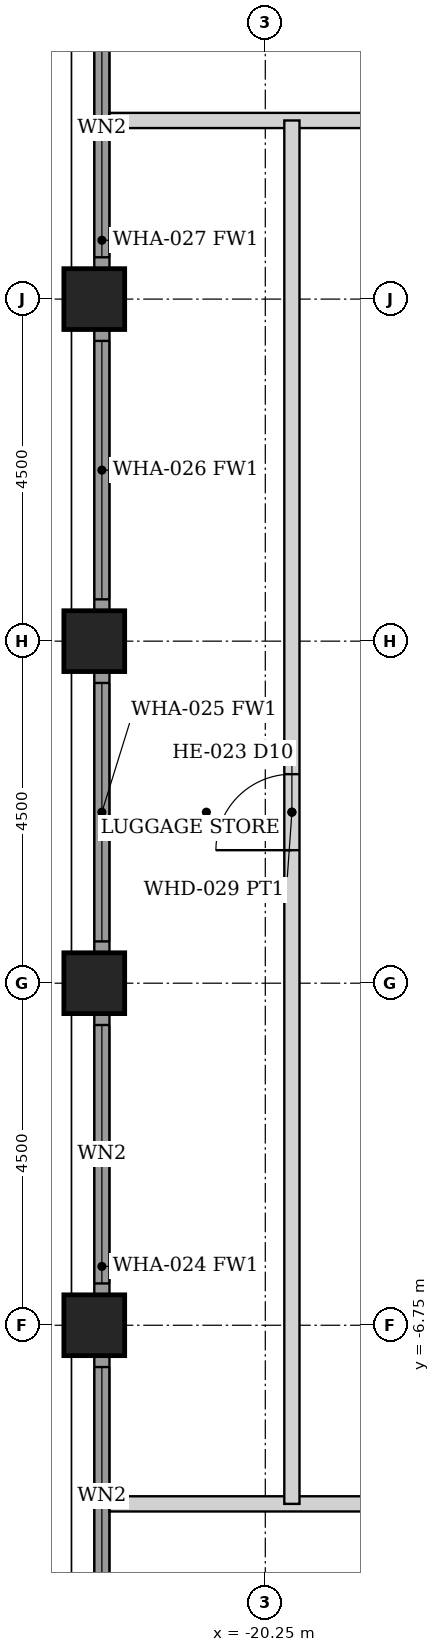
"""IFC4 building model, lengths in metres.
Left out: names, types, materials, properties, quantities, classifications, styles, units other than length and angle.
Written with IfcOpenShell. Run it as: python <this file> out.ifc"""

import sys

from ifc_helpers import new_model, si_unit, direction, frame, frame_2d, origin, origin_2d, place, context, subcontext, project, spatial, rectangle, hollow_rectangle, extrude, element, fill, save


model = new_model("IFC4")
c1 = context("Model", 3, precision=1e-05, world=origin(), true_north=direction((0.0, 1.0)))
c2 = subcontext(c1, "Body", "Model", "MODEL_VIEW")
j1 = project(units=[si_unit("LENGTHUNIT", "METRE"), si_unit("PLANEANGLEUNIT", "RADIAN")], contexts=[c1])
p1 = place(None, origin())
s1 = spatial("IfcSite", under=j1, at=p1, CompositionType="ELEMENT")
p2 = place(p1, origin())
s2 = spatial("IfcBuilding", under=s1, at=p2, CompositionType="ELEMENT")
p3 = place(p2, frame((0.0, 0.0, 161.6)))
s3 = spatial("IfcBuildingStorey", under=s2, at=p3, CompositionType="ELEMENT", Elevation=161.6)
for number, where, z_axis, x_axis in (
    (1, (-22.5, -6.75, 0.0), (0.0, 0.0, 1.0), (1.0, 0.0, 0.0)),
    (2, (-22.5, -2.25, 0.0), (0.0, 0.0, 1.0), (1.0, 0.0, 0.0)),
    (3, (-22.5, 2.25, 0.0), (0.0, 0.0, 1.0), (1.0, 0.0, 0.0)),
    (4, (-22.5, 6.75, 0.0), (0.0, 0.0, 1.0), (1.0, 0.0, 0.0)),
):
    element("IfcColumn", number, at=place(p3, frame(where, z_axis=z_axis, x_axis=x_axis)), inside=s3, PredefinedType="COLUMN", context=c2, shape_type="SweptSolid", body=[
        extrude(hollow_rectangle(XDim=0.8, YDim=0.8, WallThickness=0.05, at=origin_2d()), origin(), (0.0, 0.0, 1.0), 3.6),
    ])
p4 = place(p3, frame((-22.4, -10.845, 0.0), z_axis=(0.0, 0.0, 1.0), x_axis=(0.0, 1.0, 0.0)))
e5 = element("IfcWall", 5, at=p4, inside=s3, PredefinedType="SOLIDWALL", context=c2, shape_type="SweptSolid", body=[
    extrude(rectangle(XDim=3.69, YDim=0.2, at=frame_2d((1.845, 0.0))), origin(), (0.0, 0.0, 1.0), 2.479),
])
p5 = place(p4, frame((0.145, 0.0, 0.3)))
e6 = element("IfcOpeningElement", 6, at=p5, cuts=e5, PredefinedType="OPENING", context=c2, shape_type="SweptSolid", body=[
    extrude(rectangle(XDim=3.4, YDim=2.029, at=frame_2d((1.7, 1.015))), frame((0.0, 0.11, 0.0), z_axis=(0.0, -1.0, 0.0), x_axis=(1.0, 0.0, 0.0)), (0.0, 0.0, 1.0), 0.22),
])
p6 = place(p3, frame((-22.4, -6.345, 0.0), z_axis=(0.0, 0.0, 1.0), x_axis=(0.0, 1.0, 0.0)))
e7 = element("IfcWall", 7, at=p6, inside=s3, PredefinedType="SOLIDWALL", context=c2, shape_type="SweptSolid", body=[
    extrude(rectangle(XDim=3.69, YDim=0.2, at=frame_2d((1.845, 0.0))), origin(), (0.0, 0.0, 1.0), 2.479),
])
p7 = place(p6, frame((0.145, 0.0, 0.3)))
e8 = element("IfcOpeningElement", 8, at=p7, cuts=e7, PredefinedType="OPENING", context=c2, shape_type="SweptSolid", body=[
    extrude(rectangle(XDim=3.4, YDim=2.029, at=frame_2d((1.7, 1.015))), frame((0.0, 0.11, 0.0), z_axis=(0.0, -1.0, 0.0), x_axis=(1.0, 0.0, 0.0)), (0.0, 0.0, 1.0), 0.22),
])
p8 = place(p3, frame((-22.4, -1.845, 0.0), z_axis=(0.0, 0.0, 1.0), x_axis=(0.0, 1.0, 0.0)))
e9 = element("IfcWall", 9, at=p8, inside=s3, PredefinedType="SOLIDWALL", context=c2, shape_type="SweptSolid", body=[
    extrude(rectangle(XDim=3.69, YDim=0.2, at=frame_2d((1.845, 0.0))), origin(), (0.0, 0.0, 1.0), 2.479),
])
p9 = place(p8, frame((0.145, 0.0, 0.3)))
e10 = element("IfcOpeningElement", 10, at=p9, cuts=e9, PredefinedType="OPENING", context=c2, shape_type="SweptSolid", body=[
    extrude(rectangle(XDim=3.4, YDim=2.029, at=frame_2d((1.7, 1.015))), frame((0.0, 0.11, 0.0), z_axis=(0.0, -1.0, 0.0), x_axis=(1.0, 0.0, 0.0)), (0.0, 0.0, 1.0), 0.22),
])
p10 = place(p3, frame((-22.4, 2.655, 0.0), z_axis=(0.0, 0.0, 1.0), x_axis=(0.0, 1.0, 0.0)))
e11 = element("IfcWall", 11, at=p10, inside=s3, PredefinedType="SOLIDWALL", context=c2, shape_type="SweptSolid", body=[
    extrude(rectangle(XDim=3.69, YDim=0.2, at=frame_2d((1.845, 0.0))), origin(), (0.0, 0.0, 1.0), 2.479),
])
p11 = place(p10, frame((0.145, 0.0, 0.3)))
e12 = element("IfcOpeningElement", 12, at=p11, cuts=e11, PredefinedType="OPENING", context=c2, shape_type="SweptSolid", body=[
    extrude(rectangle(XDim=3.4, YDim=2.029, at=frame_2d((1.7, 1.015))), frame((0.0, 0.11, 0.0), z_axis=(0.0, -1.0, 0.0), x_axis=(1.0, 0.0, 0.0)), (0.0, 0.0, 1.0), 0.22),
])
p12 = place(p3, frame((-22.4, 7.155, 0.0), z_axis=(0.0, 0.0, 1.0), x_axis=(0.0, 1.0, 0.0)))
e13 = element("IfcWall", 13, at=p12, inside=s3, PredefinedType="SOLIDWALL", context=c2, shape_type="SweptSolid", body=[
    extrude(rectangle(XDim=3.69, YDim=0.2, at=frame_2d((1.845, 0.0))), origin(), (0.0, 0.0, 1.0), 2.479),
])
p13 = place(p12, frame((0.145, 0.0, 0.3)))
e14 = element("IfcOpeningElement", 14, at=p13, cuts=e13, PredefinedType="OPENING", context=c2, shape_type="SweptSolid", body=[
    extrude(rectangle(XDim=3.4, YDim=2.029, at=frame_2d((1.7, 1.015))), frame((0.0, 0.11, 0.0), z_axis=(0.0, -1.0, 0.0), x_axis=(1.0, 0.0, 0.0)), (0.0, 0.0, 1.0), 0.22),
])
p14 = place(p3, frame((-22.3, 9.1, 0.0), z_axis=(0.0, 0.0, 1.0), x_axis=(1.0, 0.0, 0.0)))
e15 = element("IfcWall", 15, at=p14, inside=s3, PredefinedType="PARTITIONING", context=c2, shape_type="SweptSolid", body=[
    extrude(rectangle(XDim=44.6, YDim=0.2, at=frame_2d((22.3, 0.0))), origin(), (0.0, 0.0, 1.0), 2.473),
])
p15 = place(p14, frame((6.75, 0.0, 0.0)))
e16 = element("IfcOpeningElement", 16, at=p15, cuts=e15, PredefinedType="OPENING", context=c2, shape_type="SweptSolid", body=[
    extrude(rectangle(XDim=0.9, YDim=2.1, at=frame_2d((0.45, 1.05))), frame((0.0, 0.11, 0.0), z_axis=(0.0, -1.0, 0.0), x_axis=(1.0, 0.0, 0.0)), (0.0, 0.0, 1.0), 0.22),
])
p16 = place(p14, frame((15.75, 0.0, 0.0)))
e17 = element("IfcOpeningElement", 17, at=p16, cuts=e15, PredefinedType="OPENING", context=c2, shape_type="SweptSolid", body=[
    extrude(rectangle(XDim=0.9, YDim=2.1, at=frame_2d((0.45, 1.05))), frame((0.0, 0.11, 0.0), z_axis=(0.0, -1.0, 0.0), x_axis=(1.0, 0.0, 0.0)), (0.0, 0.0, 1.0), 0.22),
])
p17 = place(p14, frame((20.25, 0.0, 0.0)))
e18 = element("IfcOpeningElement", 18, at=p17, cuts=e15, PredefinedType="OPENING", context=c2, shape_type="SweptSolid", body=[
    extrude(rectangle(XDim=0.9, YDim=2.1, at=frame_2d((0.45, 1.05))), frame((0.0, 0.11, 0.0), z_axis=(0.0, -1.0, 0.0), x_axis=(1.0, 0.0, 0.0)), (0.0, 0.0, 1.0), 0.22),
])
p18 = place(p14, frame((36.95, 0.0, 0.0)))
e19 = element("IfcOpeningElement", 19, at=p18, cuts=e15, PredefinedType="OPENING", context=c2, shape_type="SweptSolid", body=[
    extrude(rectangle(XDim=0.9, YDim=2.1, at=frame_2d((0.45, 1.05))), frame((0.0, 0.11, 0.0), z_axis=(0.0, -1.0, 0.0), x_axis=(1.0, 0.0, 0.0)), (0.0, 0.0, 1.0), 0.22),
])
p19 = place(p14, frame((38.85, 0.0, 0.0)))
e20 = element("IfcOpeningElement", 20, at=p19, cuts=e15, PredefinedType="OPENING", context=c2, shape_type="SweptSolid", body=[
    extrude(rectangle(XDim=0.9, YDim=2.1, at=frame_2d((0.45, 1.05))), frame((0.0, 0.11, 0.0), z_axis=(0.0, -1.0, 0.0), x_axis=(1.0, 0.0, 0.0)), (0.0, 0.0, 1.0), 0.22),
])
p20 = place(p14, frame((4.85, 0.0, 0.0)))
e21 = element("IfcOpeningElement", 21, at=p20, cuts=e15, PredefinedType="OPENING", context=c2, shape_type="SweptSolid", body=[
    extrude(rectangle(XDim=0.9, YDim=2.1, at=frame_2d((0.45, 1.05))), frame((0.0, 0.11, 0.0), z_axis=(0.0, -1.0, 0.0), x_axis=(1.0, 0.0, 0.0)), (0.0, 0.0, 1.0), 0.22),
])
p21 = place(p3, frame((-22.3, -9.1, 0.0), z_axis=(0.0, 0.0, 1.0), x_axis=(1.0, 0.0, 0.0)))
e22 = element("IfcWall", 22, at=p21, inside=s3, PredefinedType="PARTITIONING", context=c2, shape_type="SweptSolid", body=[
    extrude(rectangle(XDim=44.6, YDim=0.2, at=frame_2d((22.3, 0.0))), origin(), (0.0, 0.0, 1.0), 2.473),
])
p22 = place(p21, frame((6.75, 0.0, 0.0)))
e23 = element("IfcOpeningElement", 23, at=p22, cuts=e22, PredefinedType="OPENING", context=c2, shape_type="SweptSolid", body=[
    extrude(rectangle(XDim=0.9, YDim=2.1, at=frame_2d((0.45, 1.05))), frame((0.0, 0.11, 0.0), z_axis=(0.0, -1.0, 0.0), x_axis=(1.0, 0.0, 0.0)), (0.0, 0.0, 1.0), 0.22),
])
p23 = place(p21, frame((23.45, 0.0, 0.0)))
e24 = element("IfcOpeningElement", 24, at=p23, cuts=e22, PredefinedType="OPENING", context=c2, shape_type="SweptSolid", body=[
    extrude(rectangle(XDim=0.9, YDim=2.1, at=frame_2d((0.45, 1.05))), frame((0.0, 0.11, 0.0), z_axis=(0.0, -1.0, 0.0), x_axis=(1.0, 0.0, 0.0)), (0.0, 0.0, 1.0), 0.22),
])
p24 = place(p21, frame((27.95, 0.0, 0.0)))
e25 = element("IfcOpeningElement", 25, at=p24, cuts=e22, PredefinedType="OPENING", context=c2, shape_type="SweptSolid", body=[
    extrude(rectangle(XDim=0.9, YDim=2.1, at=frame_2d((0.45, 1.05))), frame((0.0, 0.11, 0.0), z_axis=(0.0, -1.0, 0.0), x_axis=(1.0, 0.0, 0.0)), (0.0, 0.0, 1.0), 0.22),
])
p25 = place(p21, frame((36.95, 0.0, 0.0)))
e26 = element("IfcOpeningElement", 26, at=p25, cuts=e22, PredefinedType="OPENING", context=c2, shape_type="SweptSolid", body=[
    extrude(rectangle(XDim=0.9, YDim=2.1, at=frame_2d((0.45, 1.05))), frame((0.0, 0.11, 0.0), z_axis=(0.0, -1.0, 0.0), x_axis=(1.0, 0.0, 0.0)), (0.0, 0.0, 1.0), 0.22),
])
p26 = place(p21, frame((38.85, 0.0, 0.0)))
e27 = element("IfcOpeningElement", 27, at=p26, cuts=e22, PredefinedType="OPENING", context=c2, shape_type="SweptSolid", body=[
    extrude(rectangle(XDim=0.9, YDim=2.1, at=frame_2d((0.45, 1.05))), frame((0.0, 0.11, 0.0), z_axis=(0.0, -1.0, 0.0), x_axis=(1.0, 0.0, 0.0)), (0.0, 0.0, 1.0), 0.22),
])
p27 = place(p21, frame((4.85, 0.0, 0.0)))
e28 = element("IfcOpeningElement", 28, at=p27, cuts=e22, PredefinedType="OPENING", context=c2, shape_type="SweptSolid", body=[
    extrude(rectangle(XDim=0.9, YDim=2.1, at=frame_2d((0.45, 1.05))), frame((0.0, 0.11, 0.0), z_axis=(0.0, -1.0, 0.0), x_axis=(1.0, 0.0, 0.0)), (0.0, 0.0, 1.0), 0.22),
])
p28 = place(p3, frame((-19.9, -9.1, 0.0), z_axis=(0.0, 0.0, 1.0), x_axis=(0.0, 1.0, 0.0)))
e29 = element("IfcWall", 29, at=p28, inside=s3, PredefinedType="PARTITIONING", context=c2, shape_type="SweptSolid", body=[
    extrude(rectangle(XDim=18.2, YDim=0.2, at=frame_2d((9.1, 0.0))), origin(), (0.0, 0.0, 1.0), 2.473),
])
p29 = place(p28, frame((8.6, 0.0, 0.0)))
e30 = element("IfcOpeningElement", 30, at=p29, cuts=e29, PredefinedType="OPENING", context=c2, shape_type="SweptSolid", body=[
    extrude(rectangle(XDim=1.0, YDim=2.1, at=frame_2d((0.5, 1.05))), frame((0.0, 0.11, 0.0), z_axis=(0.0, -1.0, 0.0), x_axis=(1.0, 0.0, 0.0)), (0.0, 0.0, 1.0), 0.22),
])
p30 = place(p5, origin())
e31 = element("IfcWindow", 31, at=p30, inside=s3, PartitioningType="SINGLE_PANEL", PredefinedType="WINDOW", context=c2, shape_type="SweptSolid", body=[
    extrude(rectangle(XDim=3.4, YDim=2.029, at=frame_2d((1.7, 1.015))), frame((0.0, 0.03, 0.0), z_axis=(0.0, -1.0, 0.0), x_axis=(1.0, 0.0, 0.0)), (0.0, 0.0, 1.0), 0.06),
])
fill(e6, e31)
p31 = place(p7, origin())
e32 = element("IfcWindow", 32, at=p31, inside=s3, PartitioningType="SINGLE_PANEL", PredefinedType="WINDOW", context=c2, shape_type="SweptSolid", body=[
    extrude(rectangle(XDim=3.4, YDim=2.029, at=frame_2d((1.7, 1.015))), frame((0.0, 0.03, 0.0), z_axis=(0.0, -1.0, 0.0), x_axis=(1.0, 0.0, 0.0)), (0.0, 0.0, 1.0), 0.06),
])
fill(e8, e32)
p32 = place(p9, origin())
e33 = element("IfcWindow", 33, at=p32, inside=s3, PartitioningType="SINGLE_PANEL", PredefinedType="WINDOW", context=c2, shape_type="SweptSolid", body=[
    extrude(rectangle(XDim=3.4, YDim=2.029, at=frame_2d((1.7, 1.015))), frame((0.0, 0.03, 0.0), z_axis=(0.0, -1.0, 0.0), x_axis=(1.0, 0.0, 0.0)), (0.0, 0.0, 1.0), 0.06),
])
fill(e10, e33)
p33 = place(p11, origin())
e34 = element("IfcWindow", 34, at=p33, inside=s3, PartitioningType="SINGLE_PANEL", PredefinedType="WINDOW", context=c2, shape_type="SweptSolid", body=[
    extrude(rectangle(XDim=3.4, YDim=2.029, at=frame_2d((1.7, 1.015))), frame((0.0, 0.03, 0.0), z_axis=(0.0, -1.0, 0.0), x_axis=(1.0, 0.0, 0.0)), (0.0, 0.0, 1.0), 0.06),
])
fill(e12, e34)
p34 = place(p13, origin())
e35 = element("IfcWindow", 35, at=p34, inside=s3, PartitioningType="SINGLE_PANEL", PredefinedType="WINDOW", context=c2, shape_type="SweptSolid", body=[
    extrude(rectangle(XDim=3.4, YDim=2.029, at=frame_2d((1.7, 1.015))), frame((0.0, 0.03, 0.0), z_axis=(0.0, -1.0, 0.0), x_axis=(1.0, 0.0, 0.0)), (0.0, 0.0, 1.0), 0.06),
])
fill(e14, e35)
p35 = place(p29, origin())
e36 = element("IfcDoor", 36, at=p35, inside=s3, OperationType="SINGLE_SWING_LEFT", PredefinedType="DOOR", context=c2, shape_type="SweptSolid", body=[
    extrude(rectangle(XDim=1.0, YDim=2.1, at=frame_2d((0.5, 1.05))), frame((0.0, 0.025, 0.0), z_axis=(0.0, -1.0, 0.0), x_axis=(1.0, 0.0, 0.0)), (0.0, 0.0, 1.0), 0.05),
])
fill(e30, e36)
save(model, sys.argv[1])
